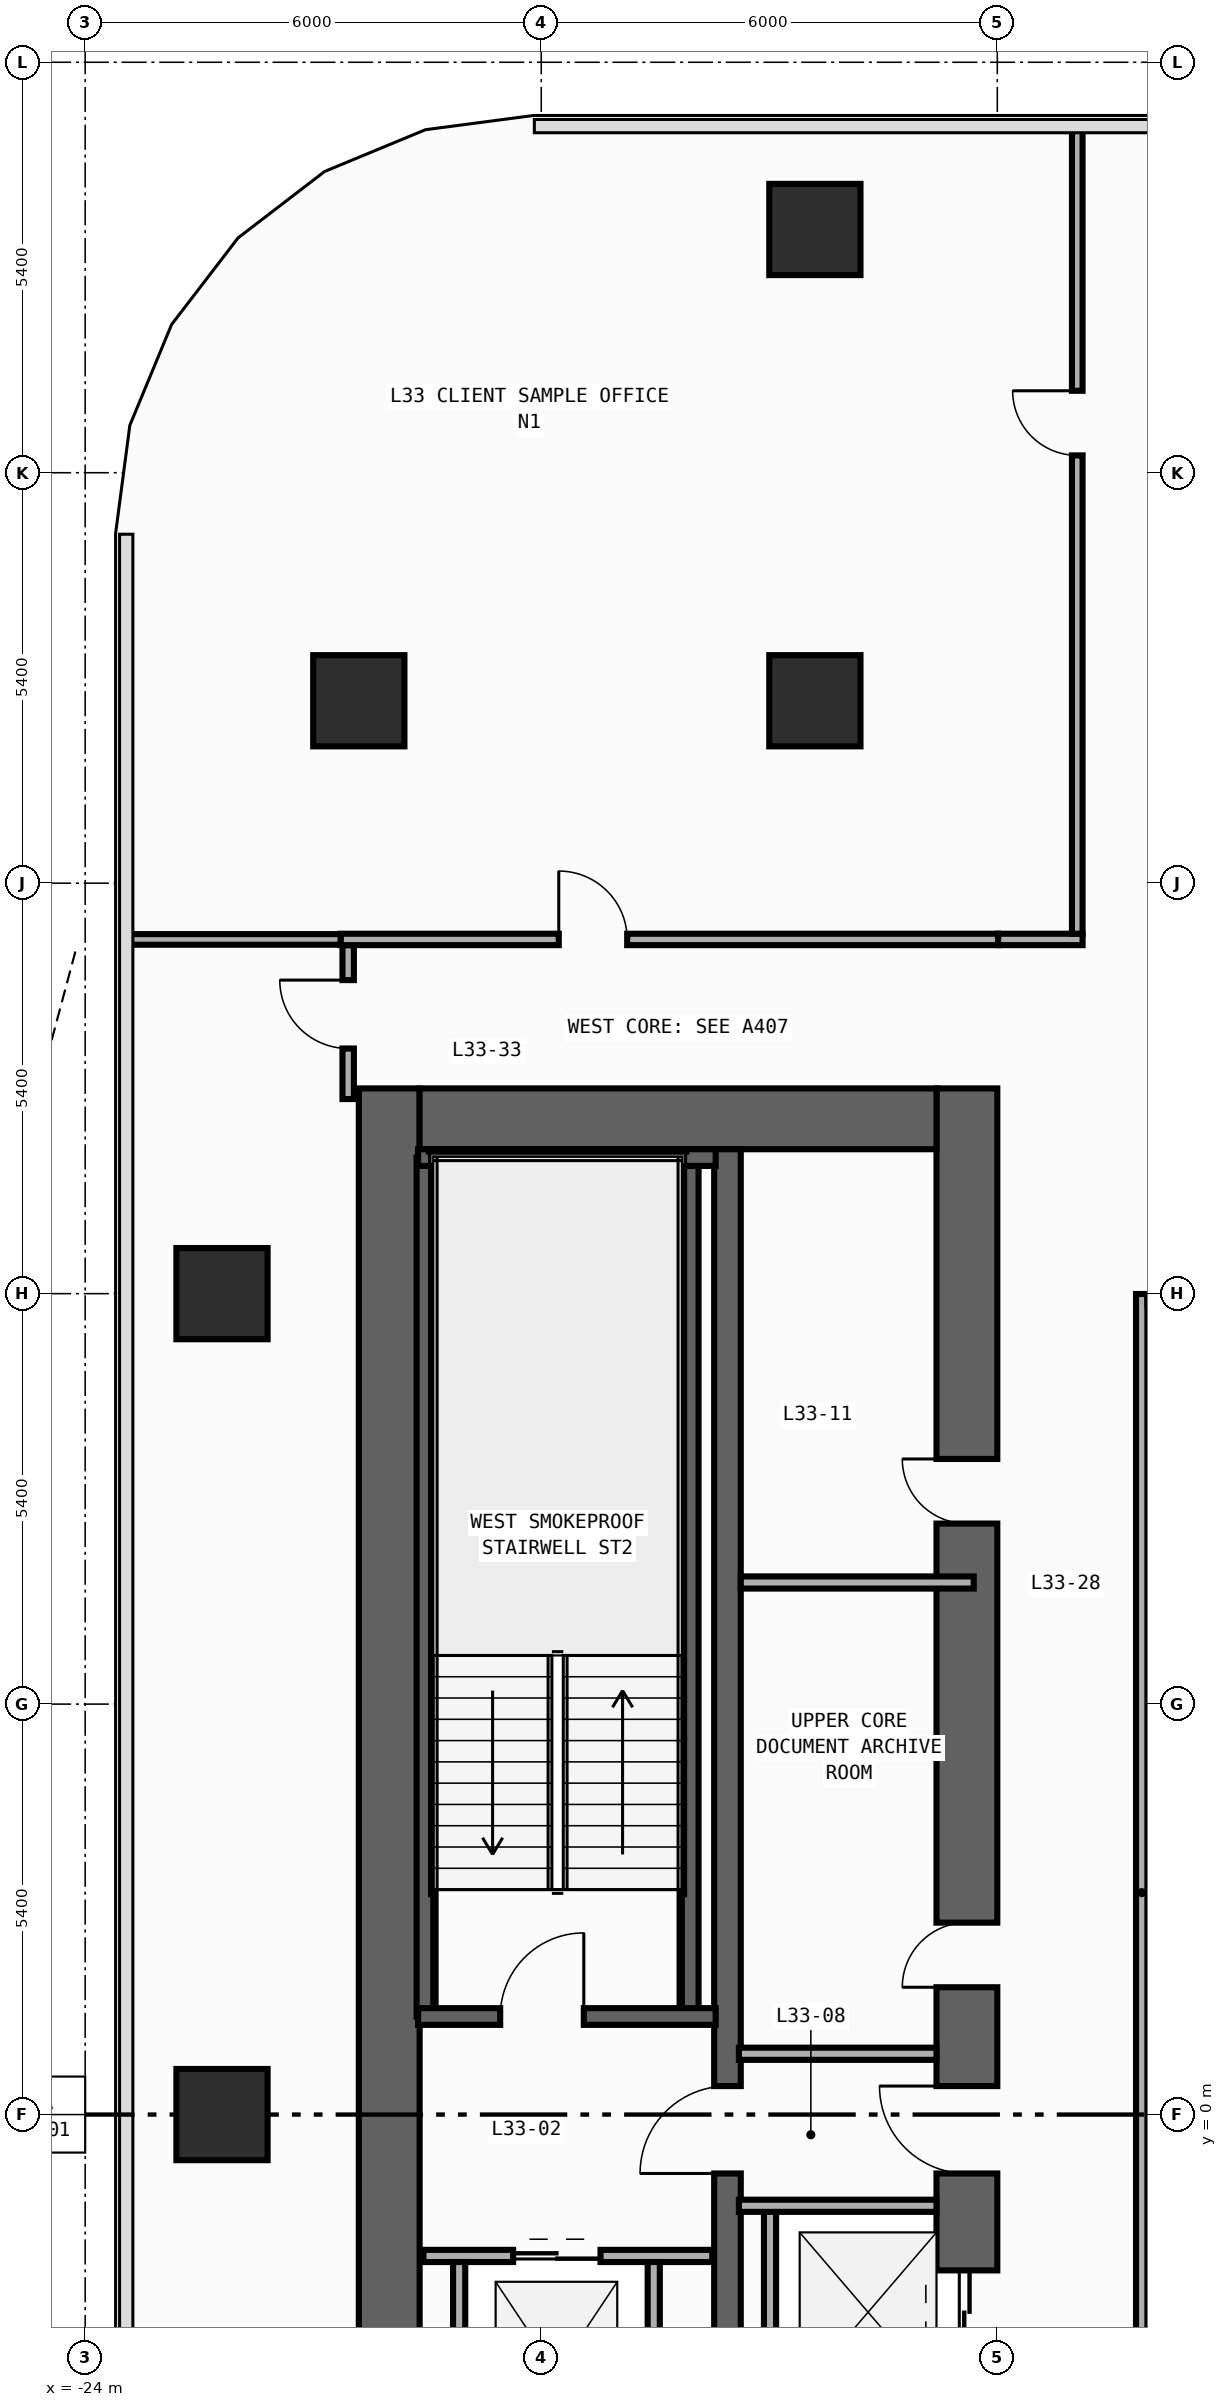
"""IFC4 building model, lengths in metres.
Left out: names, types, materials, properties, quantities, classifications, styles, units other than length and angle.
Written with IfcOpenShell. Run it as: python <this file> out.ifc"""

import sys

from ifc_helpers import new_model, si_unit, direction, frame, frame_2d, origin, origin_2d, place, context, subcontext, project, spatial, rectangle, extrude, element, fill, save


model = new_model("IFC4")
c1 = context("Model", 3, precision=1e-05, world=origin(), true_north=direction((0.0, 1.0)))
c2 = subcontext(c1, "Body", "Model", "MODEL_VIEW")
j1 = project(units=[si_unit("LENGTHUNIT", "METRE"), si_unit("PLANEANGLEUNIT", "RADIAN")], contexts=[c1])
p1 = place(None, origin())
s1 = spatial("IfcSite", under=j1, at=p1, CompositionType="ELEMENT")
p2 = place(p1, origin())
s2 = spatial("IfcBuilding", under=s1, at=p2, CompositionType="ELEMENT")
p3 = place(p2, frame((0.0, 0.0, 143.6)))
s3 = spatial("IfcBuildingStorey", under=s2, at=p3, CompositionType="ELEMENT", Elevation=143.6)
p4 = place(p3, frame((-20.0, -13.5, 0.0), z_axis=(0.0, 0.0, 1.0), x_axis=(0.0, 1.0, 0.0)))
e1 = element("IfcWall", 1, at=p4, inside=s3, PredefinedType="SHEAR", context=c2, shape_type="SweptSolid", body=[
    extrude(rectangle(XDim=27.0, YDim=0.8, at=frame_2d((13.5, 0.0))), origin(), (0.0, 0.0, 1.0), 3.94),
])
p5 = place(p3, frame((-12.4, -13.5, 0.0), z_axis=(0.0, 0.0, 1.0), x_axis=(0.0, 1.0, 0.0)))
e2 = element("IfcWall", 2, at=p5, inside=s3, PredefinedType="SHEAR", context=c2, shape_type="SweptSolid", body=[
    extrude(rectangle(XDim=27.0, YDim=0.8, at=frame_2d((13.5, 0.0))), origin(), (0.0, 0.0, 1.0), 3.94),
])
p6 = place(p5, frame((10.35, 0.0, 0.0)))
e3 = element("IfcOpeningElement", 3, at=p6, cuts=e2, PredefinedType="OPENING", context=c2, shape_type="SweptSolid", body=[
    extrude(rectangle(XDim=1.1, YDim=2.2, at=frame_2d((0.55, 1.1))), frame((0.0, 0.41, 0.0), z_axis=(0.0, -1.0, 0.0), x_axis=(1.0, 0.0, 0.0)), (0.0, 0.0, 1.0), 0.82),
])
p7 = place(p5, frame((7.15, 0.0, 0.0)))
e4 = element("IfcOpeningElement", 4, at=p7, cuts=e2, PredefinedType="OPENING", context=c2, shape_type="SweptSolid", body=[
    extrude(rectangle(XDim=1.1, YDim=2.2, at=frame_2d((0.55, 1.1))), frame((0.0, 0.41, 0.0), z_axis=(0.0, -1.0, 0.0), x_axis=(1.0, 0.0, 0.0)), (0.0, 0.0, 1.0), 0.82),
])
p8 = place(p5, frame((3.95, 0.0, 0.0)))
e5 = element("IfcOpeningElement", 5, at=p8, cuts=e2, PredefinedType="OPENING", context=c2, shape_type="SweptSolid", body=[
    extrude(rectangle(XDim=1.1, YDim=2.2, at=frame_2d((0.55, 1.1))), frame((0.0, 0.41, 0.0), z_axis=(0.0, -1.0, 0.0), x_axis=(1.0, 0.0, 0.0)), (0.0, 0.0, 1.0), 0.82),
])
p9 = place(p5, frame((15.175, 0.0, 0.0)))
e6 = element("IfcOpeningElement", 6, at=p9, cuts=e2, PredefinedType="OPENING", context=c2, shape_type="SweptSolid", body=[
    extrude(rectangle(XDim=0.85, YDim=2.1, at=frame_2d((0.425, 1.05))), frame((0.0, 0.41, 0.0), z_axis=(0.0, -1.0, 0.0), x_axis=(1.0, 0.0, 0.0)), (0.0, 0.0, 1.0), 0.82),
])
p10 = place(p5, frame((21.275, 0.0, 0.0)))
e7 = element("IfcOpeningElement", 7, at=p10, cuts=e2, PredefinedType="OPENING", context=c2, shape_type="SweptSolid", body=[
    extrude(rectangle(XDim=0.85, YDim=2.1, at=frame_2d((0.425, 1.05))), frame((0.0, 0.41, 0.0), z_axis=(0.0, -1.0, 0.0), x_axis=(1.0, 0.0, 0.0)), (0.0, 0.0, 1.0), 0.82),
])
p11 = place(p5, frame((12.725, 0.0, 0.0)))
e8 = element("IfcOpeningElement", 8, at=p11, cuts=e2, PredefinedType="OPENING", context=c2, shape_type="SweptSolid", body=[
    extrude(rectangle(XDim=1.15, YDim=2.2, at=frame_2d((0.575, 1.1))), frame((0.0, 0.41, 0.0), z_axis=(0.0, -1.0, 0.0), x_axis=(1.0, 0.0, 0.0)), (0.0, 0.0, 1.0), 0.82),
])
p12 = place(p5, frame((1.625, 0.0, 0.0)))
e9 = element("IfcOpeningElement", 9, at=p12, cuts=e2, PredefinedType="OPENING", context=c2, shape_type="SweptSolid", body=[
    extrude(rectangle(XDim=0.85, YDim=2.1, at=frame_2d((0.425, 1.05))), frame((0.0, 0.41, 0.0), z_axis=(0.0, -1.0, 0.0), x_axis=(1.0, 0.0, 0.0)), (0.0, 0.0, 1.0), 0.82),
])
p13 = place(p3, frame((-19.6, 13.1, 0.0), z_axis=(0.0, 0.0, 1.0), x_axis=(1.0, 0.0, 0.0)))
e10 = element("IfcWall", 10, at=p13, inside=s3, PredefinedType="SHEAR", context=c2, shape_type="SweptSolid", body=[
    extrude(rectangle(XDim=6.8, YDim=0.8, at=frame_2d((3.4, 0.0))), origin(), (0.0, 0.0, 1.0), 3.94),
])
p14 = place(p3, frame((-15.55, -12.7, 0.0), z_axis=(0.0, 0.0, 1.0), x_axis=(0.0, 1.0, 0.0)))
e11 = element("IfcWall", 11, at=p14, inside=s3, PredefinedType="SHEAR", context=c2, shape_type="SweptSolid", body=[
    extrude(rectangle(XDim=25.4, YDim=0.35, at=frame_2d((12.7, 0.0))), origin(), (0.0, 0.0, 1.0), 3.94),
])
p15 = place(p14, frame((11.925, 0.0, 0.0)))
e12 = element("IfcOpeningElement", 12, at=p15, cuts=e11, PredefinedType="OPENING", context=c2, shape_type="SweptSolid", body=[
    extrude(rectangle(XDim=1.15, YDim=2.2, at=frame_2d((0.575, 1.1))), frame((0.0, 0.185, 0.0), z_axis=(0.0, -1.0, 0.0), x_axis=(1.0, 0.0, 0.0)), (0.0, 0.0, 1.0), 0.37),
])
p16 = place(p14, frame((0.825, 0.0, 0.0)))
e13 = element("IfcOpeningElement", 13, at=p16, cuts=e11, PredefinedType="OPENING", context=c2, shape_type="SweptSolid", body=[
    extrude(rectangle(XDim=0.85, YDim=2.1, at=frame_2d((0.425, 1.05))), frame((0.0, 0.185, 0.0), z_axis=(0.0, -1.0, 0.0), x_axis=(1.0, 0.0, 0.0)), (0.0, 0.0, 1.0), 0.37),
])
for number, where, z_axis, x_axis in (
    (14, (-16.04, 1.29, 0.0), (0.0, 0.0, 1.0), (0.0, 1.0, 0.0)),
    (15, (-19.53, 1.29, 0.0), (0.0, 0.0, 1.0), (0.0, 1.0, 0.0)),
):
    element("IfcWall", number, at=place(p3, frame(where, z_axis=z_axis, x_axis=x_axis)), inside=s3, PredefinedType="SHEAR", context=c2, shape_type="SweptSolid", body=[
        extrude(rectangle(XDim=11.3, YDim=0.22, at=frame_2d((5.65, 0.0))), origin(), (0.0, 0.0, 1.0), 3.94),
    ])
p17 = place(p3, frame((-19.62, 12.59, 0.0), z_axis=(0.0, 0.0, 1.0), x_axis=(1.0, 0.0, 0.0)))
e16 = element("IfcWall", 16, at=p17, inside=s3, PredefinedType="SHEAR", context=c2, shape_type="SweptSolid", body=[
    extrude(rectangle(XDim=3.915, YDim=0.22, at=frame_2d((1.958, 0.0))), origin(), (0.0, 0.0, 1.0), 3.94),
])
p18 = place(p3, frame((-19.62, 1.29, 0.0), z_axis=(0.0, 0.0, 1.0), x_axis=(1.0, 0.0, 0.0)))
e17 = element("IfcWall", 17, at=p18, inside=s3, PredefinedType="SHEAR", context=c2, shape_type="SweptSolid", body=[
    extrude(rectangle(XDim=3.915, YDim=0.22, at=frame_2d((1.958, 0.0))), origin(), (0.0, 0.0, 1.0), 3.94),
])
p19 = place(p18, frame((1.08, 0.0, 0.0)))
e18 = element("IfcOpeningElement", 18, at=p19, cuts=e17, PredefinedType="OPENING", context=c2, shape_type="SweptSolid", body=[
    extrude(rectangle(XDim=1.1, YDim=2.2, at=frame_2d((0.55, 1.1))), frame((0.0, 0.12, 0.0), z_axis=(0.0, -1.0, 0.0), x_axis=(1.0, 0.0, 0.0)), (0.0, 0.0, 1.0), 0.24),
])
for number, where, z_axis, x_axis in (
    (19, (-20.4, 18.6, 0.0), (0.0, 0.0, 1.0), (1.0, 0.0, 0.0)),
    (20, (-14.4, 18.6, 0.0), (0.0, 0.0, 1.0), (1.0, 0.0, 0.0)),
    (21, (-22.2, 0.0, 0.0), (0.0, 0.0, 1.0), (1.0, 0.0, 0.0)),
    (22, (-22.2, 10.8, 0.0), (0.0, 0.0, 1.0), (1.0, 0.0, 0.0)),
    (23, (-14.4, 24.8, 0.0), (0.0, 0.0, 1.0), (1.0, 0.0, 0.0)),
):
    element("IfcColumn", number, at=place(p3, frame(where, z_axis=z_axis, x_axis=x_axis)), inside=s3, PredefinedType="COLUMN", context=c2, shape_type="SweptSolid", body=[
        extrude(rectangle(XDim=1.2, YDim=1.2, at=origin_2d()), origin(), (0.0, 0.0, 1.0), 4.2),
    ])
p20 = place(p3, frame((-14.99, -3.95, 0.0), z_axis=(0.0, 0.0, 1.0), x_axis=(0.0, 1.0, 0.0)))
e24 = element("IfcWall", 24, at=p20, inside=s3, PredefinedType="STANDARD", context=c2, shape_type="SweptSolid", body=[
    extrude(rectangle(XDim=2.7, YDim=0.16, at=frame_2d((1.35, 0.0))), origin(), (0.0, 0.0, 1.0), 3.94),
])
p21 = place(p3, frame((-19.55, -1.86, 0.0), z_axis=(0.0, 0.0, 1.0), x_axis=(1.0, 0.0, 0.0)))
e25 = element("IfcWall", 25, at=p21, inside=s3, PredefinedType="STANDARD", context=c2, shape_type="SweptSolid", body=[
    extrude(rectangle(XDim=3.8, YDim=0.16, at=frame_2d((1.9, 0.0))), origin(), (0.0, 0.0, 1.0), 3.94),
])
p22 = place(p21, frame((1.18, 0.0, 0.0)))
e26 = element("IfcOpeningElement", 26, at=p22, cuts=e25, PredefinedType="OPENING", context=c2, shape_type="SweptSolid", body=[
    extrude(rectangle(XDim=1.15, YDim=2.2, at=frame_2d((0.575, 1.1))), frame((0.0, 0.09, 0.0), z_axis=(0.0, -1.0, 0.0), x_axis=(1.0, 0.0, 0.0)), (0.0, 0.0, 1.0), 0.18),
])
for number, where, z_axis, x_axis in (
    (27, (-19.08, -4.9, 0.0), (0.0, 0.0, 1.0), (0.0, 1.0, 0.0)),
    (28, (-16.52, -4.9, 0.0), (0.0, 0.0, 1.0), (0.0, 1.0, 0.0)),
):
    element("IfcWall", number, at=place(p3, frame(where, z_axis=z_axis, x_axis=x_axis)), inside=s3, PredefinedType="STANDARD", context=c2, shape_type="SweptSolid", body=[
        extrude(rectangle(XDim=2.96, YDim=0.16, at=frame_2d((1.48, 0.0))), origin(), (0.0, 0.0, 1.0), 3.94),
    ])
for number, where, z_axis, x_axis in (
    (29, (-15.4, 0.8, 0.0), (0.0, 0.0, 1.0), (1.0, 0.0, 0.0)),
    (30, (-15.4, -1.2, 0.0), (0.0, 0.0, 1.0), (1.0, 0.0, 0.0)),
):
    element("IfcWall", number, at=place(p3, frame(where, z_axis=z_axis, x_axis=x_axis)), inside=s3, PredefinedType="STANDARD", context=c2, shape_type="SweptSolid", body=[
        extrude(rectangle(XDim=2.6, YDim=0.16, at=frame_2d((1.3, 0.0))), origin(), (0.0, 0.0, 1.0), 3.94),
    ])
p23 = place(p3, frame((-15.375, 7.0, 0.0), z_axis=(0.0, 0.0, 1.0), x_axis=(1.0, 0.0, 0.0)))
e31 = element("IfcWall", 31, at=p23, inside=s3, PredefinedType="PARTITIONING", context=c2, shape_type="SweptSolid", body=[
    extrude(rectangle(XDim=3.065, YDim=0.16, at=frame_2d((1.532, 0.0))), origin(), (0.0, 0.0, 1.0), 3.94),
])
p24 = place(p3, frame((-11.99, 15.46, 0.0), z_axis=(0.0, 0.0, 1.0), x_axis=(1.0, 0.0, 0.0)))
e32 = element("IfcWall", 32, at=p24, inside=s3, PredefinedType="PARTITIONING", context=c2, shape_type="SweptSolid", body=[
    extrude(rectangle(XDim=1.112, YDim=0.15, at=frame_2d((0.556, 0.0))), origin(), (0.0, 0.0, 1.0), 3.94),
])
p25 = place(p3, frame((-10.1, -7.12, 0.0), z_axis=(0.0, 0.0, 1.0), x_axis=(0.0, 1.0, 0.0)))
e33 = element("IfcWall", 33, at=p25, inside=s3, PredefinedType="PARTITIONING", context=c2, shape_type="SweptSolid", body=[
    extrude(rectangle(XDim=17.915, YDim=0.15, at=frame_2d((8.958, 0.0))), origin(), (0.0, 0.0, 1.0), 3.94),
])
p26 = place(p25, frame((1.265, 0.0, 0.0)))
e34 = element("IfcOpeningElement", 34, at=p26, cuts=e33, PredefinedType="OPENING", context=c2, shape_type="SweptSolid", body=[
    extrude(rectangle(XDim=0.9, YDim=2.15, at=frame_2d((0.45, 1.075))), frame((0.0, 0.085, 0.0), z_axis=(0.0, -1.0, 0.0), x_axis=(1.0, 0.0, 0.0)), (0.0, 0.0, 1.0), 0.17),
])
p27 = place(p3, frame((-20.54, 13.36, 0.0), z_axis=(0.0, 0.0, 1.0), x_axis=(0.0, 1.0, 0.0)))
e35 = element("IfcWall", 35, at=p27, inside=s3, PredefinedType="PARTITIONING", context=c2, shape_type="SweptSolid", body=[
    extrude(rectangle(XDim=2.025, YDim=0.15, at=frame_2d((1.012, 0.0))), origin(), (0.0, 0.0, 1.0), 3.94),
])
p28 = place(p27, frame((0.665, 0.0, 0.0)))
e36 = element("IfcOpeningElement", 36, at=p28, cuts=e35, PredefinedType="OPENING", context=c2, shape_type="SweptSolid", body=[
    extrude(rectangle(XDim=0.9, YDim=2.15, at=frame_2d((0.45, 1.075))), frame((0.0, 0.085, 0.0), z_axis=(0.0, -1.0, 0.0), x_axis=(1.0, 0.0, 0.0)), (0.0, 0.0, 1.0), 0.17),
])
p29 = place(p3, frame((-20.64, 15.46, 0.0), z_axis=(0.0, 0.0, 1.0), x_axis=(1.0, 0.0, 0.0)))
e37 = element("IfcWall", 37, at=p29, inside=s3, PredefinedType="PARTITIONING", context=c2, shape_type="SweptSolid", body=[
    extrude(rectangle(XDim=8.65, YDim=0.15, at=frame_2d((4.325, 0.0))), origin(), (0.0, 0.0, 1.0), 3.94),
])
p30 = place(p29, frame((2.871, 0.0, 0.0)))
e38 = element("IfcOpeningElement", 38, at=p30, cuts=e37, PredefinedType="OPENING", context=c2, shape_type="SweptSolid", body=[
    extrude(rectangle(XDim=0.9, YDim=2.15, at=frame_2d((0.45, 1.075))), frame((0.0, 0.085, 0.0), z_axis=(0.0, -1.0, 0.0), x_axis=(1.0, 0.0, 0.0)), (0.0, 0.0, 1.0), 0.17),
])
p31 = place(p3, frame((-23.455, 15.46, 0.0), z_axis=(0.0, 0.0, 1.0), x_axis=(1.0, 0.0, 0.0)))
e39 = element("IfcWall", 39, at=p31, inside=s3, PredefinedType="PARTITIONING", context=c2, shape_type="SweptSolid", body=[
    extrude(rectangle(XDim=2.815, YDim=0.14, at=frame_2d((1.408, 0.0))), origin(), (0.0, 0.0, 1.0), 3.94),
])
p32 = place(p3, frame((-10.948, 15.535, 0.0), z_axis=(0.0, 0.0, 1.0), x_axis=(0.0, 1.0, 0.0)))
e40 = element("IfcWall", 40, at=p32, inside=s3, PredefinedType="PARTITIONING", context=c2, shape_type="SweptSolid", body=[
    extrude(rectangle(XDim=10.62, YDim=0.14, at=frame_2d((5.31, 0.0))), origin(), (0.0, 0.0, 1.0), 3.94),
])
p33 = place(p32, frame((6.293, 0.0, 0.0)))
e41 = element("IfcOpeningElement", 41, at=p33, cuts=e40, PredefinedType="OPENING", context=c2, shape_type="SweptSolid", body=[
    extrude(rectangle(XDim=0.85, YDim=2.1, at=frame_2d((0.425, 1.05))), frame((0.0, 0.08, 0.0), z_axis=(0.0, -1.0, 0.0), x_axis=(1.0, 0.0, 0.0)), (0.0, 0.0, 1.0), 0.16),
])
p34 = place(p19, origin())
e42 = element("IfcDoor", 42, at=p34, inside=s3, OperationType="SINGLE_SWING_RIGHT", PredefinedType="DOOR", context=c2, shape_type="SweptSolid", body=[
    extrude(rectangle(XDim=1.1, YDim=2.2, at=frame_2d((0.55, 1.1))), frame((0.0, 0.025, 0.0), z_axis=(0.0, -1.0, 0.0), x_axis=(1.0, 0.0, 0.0)), (0.0, 0.0, 1.0), 0.05),
])
fill(e18, e42)
p35 = place(p6, origin())
e43 = element("IfcDoor", 43, at=p35, inside=s3, OperationType="DOUBLE_DOOR_SLIDING", PredefinedType="DOOR", context=c2, shape_type="SweptSolid", body=[
    extrude(rectangle(XDim=1.1, YDim=2.2, at=frame_2d((0.55, 1.1))), frame((0.0, 0.025, 0.0), z_axis=(0.0, -1.0, 0.0), x_axis=(1.0, 0.0, 0.0)), (0.0, 0.0, 1.0), 0.05),
])
fill(e3, e43)
p36 = place(p9, origin())
e44 = element("IfcDoor", 44, at=p36, inside=s3, OperationType="SINGLE_SWING_LEFT", PredefinedType="DOOR", context=c2, shape_type="SweptSolid", body=[
    extrude(rectangle(XDim=0.85, YDim=2.1, at=frame_2d((0.425, 1.05))), frame((0.0, 0.025, 0.0), z_axis=(0.0, -1.0, 0.0), x_axis=(1.0, 0.0, 0.0)), (0.0, 0.0, 1.0), 0.05),
])
fill(e6, e44)
p37 = place(p10, origin())
e45 = element("IfcDoor", 45, at=p37, inside=s3, OperationType="SINGLE_SWING_RIGHT", PredefinedType="DOOR", context=c2, shape_type="SweptSolid", body=[
    extrude(rectangle(XDim=0.85, YDim=2.1, at=frame_2d((0.425, 1.05))), frame((0.0, 0.025, 0.0), z_axis=(0.0, -1.0, 0.0), x_axis=(1.0, 0.0, 0.0)), (0.0, 0.0, 1.0), 0.05),
])
fill(e7, e45)
p38 = place(p11, origin())
e46 = element("IfcDoor", 46, at=p38, inside=s3, OperationType="SINGLE_SWING_RIGHT", PredefinedType="DOOR", context=c2, shape_type="SweptSolid", body=[
    extrude(rectangle(XDim=1.15, YDim=2.2, at=frame_2d((0.575, 1.1))), frame((0.0, 0.025, 0.0), z_axis=(0.0, -1.0, 0.0), x_axis=(1.0, 0.0, 0.0)), (0.0, 0.0, 1.0), 0.05),
])
fill(e8, e46)
p39 = place(p15, origin())
e47 = element("IfcDoor", 47, at=p39, inside=s3, OperationType="SINGLE_SWING_LEFT", PredefinedType="DOOR", context=c2, shape_type="SweptSolid", body=[
    extrude(rectangle(XDim=1.15, YDim=2.2, at=frame_2d((0.575, 1.1))), frame((0.0, 0.025, 0.0), z_axis=(0.0, -1.0, 0.0), x_axis=(1.0, 0.0, 0.0)), (0.0, 0.0, 1.0), 0.05),
])
fill(e12, e47)
p40 = place(p22, origin())
e48 = element("IfcDoor", 48, at=p40, inside=s3, OperationType="DOUBLE_DOOR_SLIDING", PredefinedType="DOOR", context=c2, shape_type="SweptSolid", body=[
    extrude(rectangle(XDim=1.15, YDim=2.2, at=frame_2d((0.575, 1.1))), frame((0.0, 0.025, 0.0), z_axis=(0.0, -1.0, 0.0), x_axis=(1.0, 0.0, 0.0)), (0.0, 0.0, 1.0), 0.05),
])
fill(e26, e48)
p41 = place(p28, origin())
e49 = element("IfcDoor", 49, at=p41, inside=s3, OperationType="SINGLE_SWING_RIGHT", PredefinedType="DOOR", context=c2, shape_type="SweptSolid", body=[
    extrude(rectangle(XDim=0.9, YDim=2.15, at=frame_2d((0.45, 1.075))), frame((0.0, 0.025, 0.0), z_axis=(0.0, -1.0, 0.0), x_axis=(1.0, 0.0, 0.0)), (0.0, 0.0, 1.0), 0.05),
])
fill(e36, e49)
p42 = place(p30, origin())
e50 = element("IfcDoor", 50, at=p42, inside=s3, OperationType="SINGLE_SWING_LEFT", PredefinedType="DOOR", context=c2, shape_type="SweptSolid", body=[
    extrude(rectangle(XDim=0.9, YDim=2.15, at=frame_2d((0.45, 1.075))), frame((0.0, 0.025, 0.0), z_axis=(0.0, -1.0, 0.0), x_axis=(1.0, 0.0, 0.0)), (0.0, 0.0, 1.0), 0.05),
])
fill(e38, e50)
p43 = place(p33, origin())
e51 = element("IfcDoor", 51, at=p43, inside=s3, OperationType="SINGLE_SWING_RIGHT", PredefinedType="DOOR", context=c2, shape_type="SweptSolid", body=[
    extrude(rectangle(XDim=0.85, YDim=2.1, at=frame_2d((0.425, 1.05))), frame((0.0, 0.025, 0.0), z_axis=(0.0, -1.0, 0.0), x_axis=(1.0, 0.0, 0.0)), (0.0, 0.0, 1.0), 0.05),
])
fill(e41, e51)
save(model, sys.argv[1])
